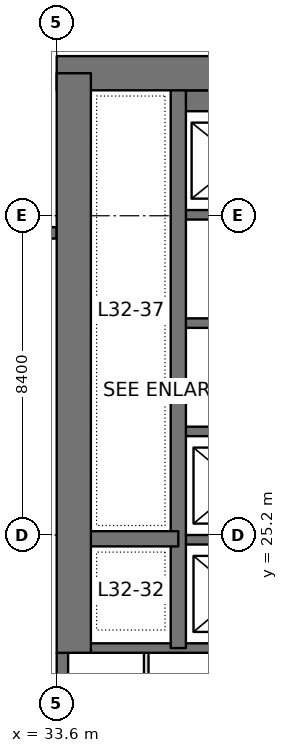
"""IFC4 building model, lengths in metres.
Left out: names, types, materials, properties, quantities, classifications, styles, units other than length and angle.
Written with IfcOpenShell. Run it as: python <this file> out.ifc"""

import sys

from ifc_helpers import new_model, si_unit, direction, frame, frame_2d, origin, place, context, subcontext, project, spatial, rectangle, extrude, element, save


model = new_model("IFC4")
c1 = context("Model", 3, precision=1e-05, world=origin(), true_north=direction((0.0, 1.0)))
c2 = subcontext(c1, "Body", "Model", "MODEL_VIEW")
j1 = project(units=[si_unit("LENGTHUNIT", "METRE"), si_unit("PLANEANGLEUNIT", "RADIAN")], contexts=[c1])
p1 = place(None, origin())
s1 = spatial("IfcSite", under=j1, at=p1, CompositionType="ELEMENT")
p2 = place(p1, origin())
s2 = spatial("IfcBuilding", under=s1, at=p2, CompositionType="ELEMENT")
p3 = place(p2, frame((0.0, 0.0, 142.8)))
s3 = spatial("IfcBuildingStorey", under=s2, at=p3, CompositionType="ELEMENT", Elevation=142.8)
p4 = place(p3, frame((33.6, 37.35, 0.0), z_axis=(0.0, 0.0, 1.0), x_axis=(1.0, 0.0, 0.0)))
e1 = element("IfcWall", 1, at=p4, inside=s3, PredefinedType="SHEAR", context=c2, shape_type="SweptSolid", body=[
    extrude(rectangle(XDim=18.0, YDim=0.9, at=frame_2d((9.0, 0.0))), origin(), (0.0, 0.0, 1.0), 4.2),
])
p5 = place(p4, frame((7.25, 0.0, 0.0)))
e2 = element("IfcOpeningElement", 2, at=p5, cuts=e1, PredefinedType="OPENING", context=c2, shape_type="SweptSolid", body=[
    extrude(rectangle(XDim=1.8, YDim=2.4, at=frame_2d((0.9, 1.2))), frame((0.0, 0.46, 0.0), z_axis=(0.0, -1.0, 0.0), x_axis=(1.0, 0.0, 0.0)), (0.0, 0.0, 1.0), 0.92),
])
p6 = place(p3, frame((34.05, 22.1, 0.0), z_axis=(0.0, 0.0, 1.0), x_axis=(0.0, 1.0, 0.0)))
e3 = element("IfcWall", 3, at=p6, inside=s3, PredefinedType="SHEAR", context=c2, shape_type="SweptSolid", body=[
    extrude(rectangle(XDim=15.25, YDim=0.9, at=frame_2d((7.625, 0.0))), origin(), (0.0, 0.0, 1.0), 4.2),
])
p7 = place(p3, frame((36.8, 22.225, 0.0), z_axis=(0.0, 0.0, 1.0), x_axis=(0.0, 1.0, 0.0)))
e4 = element("IfcWall", 4, at=p7, inside=s3, PredefinedType="SHEAR", context=c2, shape_type="SweptSolid", body=[
    extrude(rectangle(XDim=15.125, YDim=0.4, at=frame_2d((7.562, 0.0))), origin(), (0.0, 0.0, 1.0), 4.2),
])
p8 = place(p3, frame((36.8, 25.1, 0.0), z_axis=(0.0, 0.0, 1.0), x_axis=(-1.0, 0.0, 0.0)))
e5 = element("IfcWall", 5, at=p8, inside=s3, PredefinedType="SHEAR", context=c2, shape_type="SweptSolid", body=[
    extrude(rectangle(XDim=2.75, YDim=0.4, at=frame_2d((1.375, 0.0))), origin(), (0.0, 0.0, 1.0), 4.2),
])
p9 = place(p3, frame((40.0, 22.225, 0.0), z_axis=(0.0, 0.0, 1.0), x_axis=(-1.0, 0.0, 0.0)))
e6 = element("IfcWall", 6, at=p9, inside=s3, PredefinedType="SHEAR", context=c2, shape_type="SweptSolid", body=[
    extrude(rectangle(XDim=5.95, YDim=0.25, at=frame_2d((2.975, 0.0))), origin(), (0.0, 0.0, 1.0), 4.2),
])
for number, where, z_axis, x_axis in (
    (7, (40.0, 25.075, 0.0), (0.0, 0.0, 1.0), (-1.0, 0.0, 0.0)),
    (8, (40.0, 27.925, 0.0), (0.0, 0.0, 1.0), (-1.0, 0.0, 0.0)),
    (9, (40.0, 30.775, 0.0), (0.0, 0.0, 1.0), (-1.0, 0.0, 0.0)),
    (10, (40.0, 33.625, 0.0), (0.0, 0.0, 1.0), (-1.0, 0.0, 0.0)),
):
    element("IfcWall", number, at=place(p3, frame(where, z_axis=z_axis, x_axis=x_axis)), inside=s3, PredefinedType="SHEAR", context=c2, shape_type="SweptSolid", body=[
        extrude(rectangle(XDim=3.2, YDim=0.25, at=frame_2d((1.6, 0.0))), origin(), (0.0, 0.0, 1.0), 4.2),
    ])
p10 = place(p3, frame((40.0, 36.625, 0.0), z_axis=(0.0, 0.0, 1.0), x_axis=(-1.0, 0.0, 0.0)))
e11 = element("IfcWall", 11, at=p10, inside=s3, PredefinedType="SHEAR", context=c2, shape_type="SweptSolid", body=[
    extrude(rectangle(XDim=3.2, YDim=0.55, at=frame_2d((1.6, 0.0))), origin(), (0.0, 0.0, 1.0), 4.2),
])
p11 = place(p3, frame((33.75, 17.1, 0.0), z_axis=(0.0, 0.0, 1.0), x_axis=(0.0, 1.0, 0.0)))
e12 = element("IfcWall", 12, at=p11, inside=s3, PredefinedType="SOLIDWALL", context=c2, shape_type="SweptSolid", body=[
    extrude(rectangle(XDim=5.0, YDim=0.3, at=frame_2d((2.5, 0.0))), origin(), (0.0, 0.0, 1.0), 4.05),
])
p12 = place(p11, frame((1.3, 0.0, 0.1)))
e13 = element("IfcOpeningElement", 13, at=p12, cuts=e12, PredefinedType="OPENING", context=c2, shape_type="SweptSolid", body=[
    extrude(rectangle(XDim=2.0, YDim=3.0, at=frame_2d((1.0, 1.5))), frame((0.0, 0.16, 0.0), z_axis=(0.0, -1.0, 0.0), x_axis=(1.0, 0.0, 0.0)), (0.0, 0.0, 1.0), 0.32),
])
p13 = place(p3, frame((26.025, 33.15, 0.0), z_axis=(0.0, 0.0, 1.0), x_axis=(1.0, 0.0, 0.0)))
e14 = element("IfcWall", 14, at=p13, inside=s3, PredefinedType="SOLIDWALL", context=c2, shape_type="SweptSolid", body=[
    extrude(rectangle(XDim=7.575, YDim=0.3, at=frame_2d((3.788, 0.0))), origin(), (0.0, 0.0, 1.0), 4.05),
])
p14 = place(p13, frame((0.587, 0.0, 0.1)))
e15 = element("IfcOpeningElement", 15, at=p14, cuts=e14, PredefinedType="OPENING", context=c2, shape_type="SweptSolid", body=[
    extrude(rectangle(XDim=2.0, YDim=3.0, at=frame_2d((1.0, 1.5))), frame((0.0, 0.16, 0.0), z_axis=(0.0, -1.0, 0.0), x_axis=(1.0, 0.0, 0.0)), (0.0, 0.0, 1.0), 0.32),
])
p15 = place(p13, frame((4.188, 0.0, 0.1)))
e16 = element("IfcOpeningElement", 16, at=p15, cuts=e14, PredefinedType="OPENING", context=c2, shape_type="SweptSolid", body=[
    extrude(rectangle(XDim=2.0, YDim=3.0, at=frame_2d((1.0, 1.5))), frame((0.0, 0.16, 0.0), z_axis=(0.0, -1.0, 0.0), x_axis=(1.0, 0.0, 0.0)), (0.0, 0.0, 1.0), 0.32),
])
p16 = place(p3, frame((35.956, 17.458, 0.0), z_axis=(0.0, 0.0, 1.0), x_axis=(0.0, 1.0, 0.0)))
e17 = element("IfcWall", 17, at=p16, inside=s3, PredefinedType="PARTITIONING", context=c2, shape_type="SweptSolid", body=[
    extrude(rectangle(XDim=4.644, YDim=0.12, at=frame_2d((2.322, 0.0))), origin(), (0.0, 0.0, 1.0), 3.6),
])
save(model, sys.argv[1])
